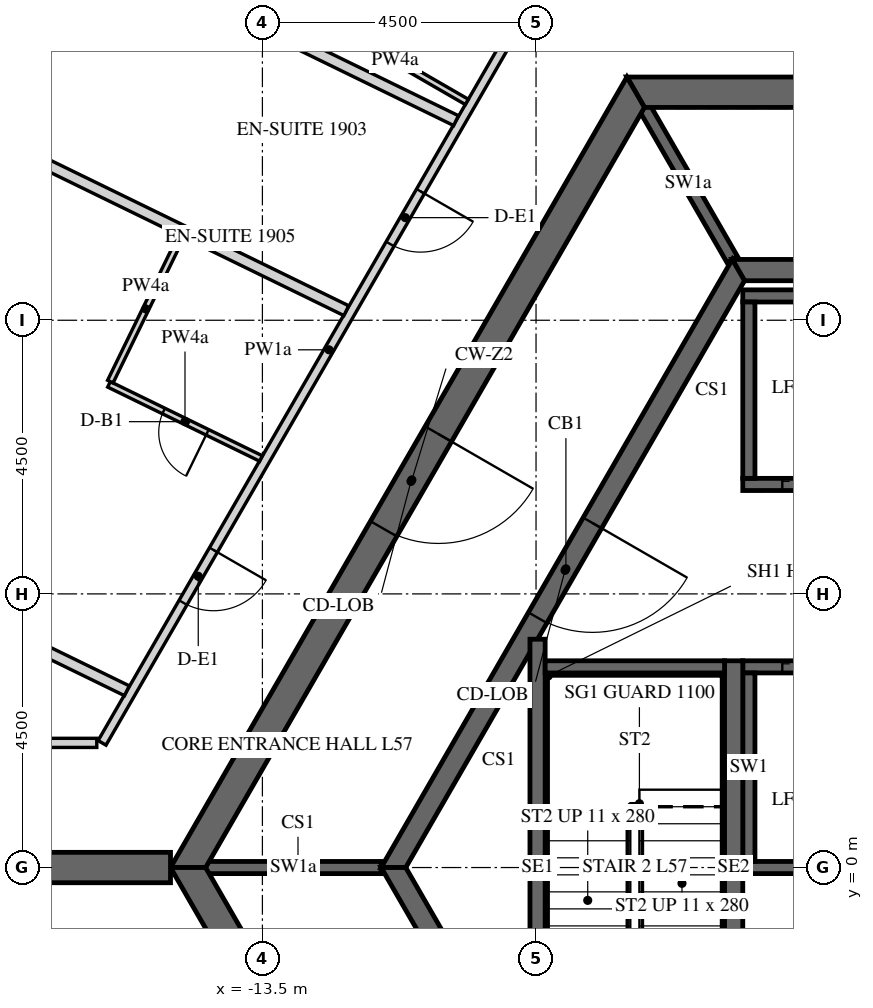
"""IFC4 building model, lengths in metres.
Left out: names, types, materials, properties, quantities, classifications, styles, units other than length and angle.
Written with IfcOpenShell. Run it as: python <this file> out.ifc"""

import sys

from ifc_helpers import new_model, si_unit, direction, frame, frame_2d, origin, place, context, subcontext, project, spatial, polyline, rectangle, outline, extrude, element, fill, save


model = new_model("IFC4")
c1 = context("Model", 3, precision=1e-05, world=origin(), true_north=direction((0.0, 1.0)))
c2 = subcontext(c1, "Body", "Model", "MODEL_VIEW")
j1 = project(units=[si_unit("LENGTHUNIT", "METRE"), si_unit("PLANEANGLEUNIT", "RADIAN")], contexts=[c1])
p1 = place(None, origin())
s1 = spatial("IfcSite", under=j1, at=p1, CompositionType="ELEMENT")
p2 = place(p1, origin())
s2 = spatial("IfcBuilding", under=s1, at=p2, CompositionType="ELEMENT")
p3 = place(p2, frame((0.0, 0.0, 238.5)))
s3 = spatial("IfcBuildingStorey", under=s2, at=p3, CompositionType="ELEMENT", Elevation=238.5)
p4 = place(p3, frame((-7.361, 12.75, -0.15), z_axis=(0.0, 0.0, 1.0), x_axis=(-0.50000571537, -0.866022103989, 0.0)))
e1 = element("IfcWall", 1, at=p4, inside=s3, PredefinedType="SHEAR", context=c2, shape_type="SweptSolid", body=[
    extrude(outline(polyline([(-0.144, -0.25), (14.867, -0.25), (14.578, 0.25), (0.144, 0.25), (-0.144, -0.25)])), origin(), (0.0, 0.0, 1.0), 3.9),
])
p5 = place(p4, frame((6.49, 0.0, 0.15)))
e2 = element("IfcOpeningElement", 2, at=p5, cuts=e1, PredefinedType="OPENING", context=c2, shape_type="SweptSolid", body=[
    extrude(rectangle(XDim=1.8, YDim=2.4, at=frame_2d((0.9, 1.2))), frame((0.0, 0.26, 0.0), z_axis=(0.0, -1.0, 0.0), x_axis=(1.0, 0.0, 0.0)), (0.0, 0.0, 1.0), 0.52),
])
p6 = place(p3, frame((-14.722, 0.0, -0.15), z_axis=(0.0, 0.0, 1.0), x_axis=(0.50000571537, -0.866022103989, 0.0)))
e3 = element("IfcWall", 3, at=p6, inside=s3, PredefinedType="SHEAR", context=c2, shape_type="SweptSolid", body=[
    extrude(outline(polyline([(-0.144, -0.25), (14.867, -0.25), (14.578, 0.25), (0.144, 0.25), (-0.144, -0.25)])), origin(), (0.0, 0.0, 1.0), 3.9),
])
p7 = place(p6, frame((6.432, 0.0, 0.15)))
e4 = element("IfcOpeningElement", 4, at=p7, cuts=e3, PredefinedType="OPENING", context=c2, shape_type="SweptSolid", body=[
    extrude(rectangle(XDim=1.8, YDim=2.4, at=frame_2d((0.9, 1.2))), frame((0.0, 0.26, 0.0), z_axis=(0.0, -1.0, 0.0), x_axis=(1.0, 0.0, 0.0)), (0.0, 0.0, 1.0), 0.52),
])
p8 = place(p3, frame((7.361, 12.75, -0.15), z_axis=(0.0, 0.0, 1.0), x_axis=(-1.0, 0.0, 0.0)))
e5 = element("IfcWall", 5, at=p8, inside=s3, PredefinedType="SHEAR", context=c2, shape_type="SweptSolid", body=[
    extrude(outline(polyline([(-0.144, -0.25), (14.866, -0.25), (14.578, 0.25), (0.144, 0.25), (-0.144, -0.25)])), origin(), (0.0, 0.0, 1.0), 3.9),
])
p9 = place(p8, frame((6.761, 0.0, 0.15)))
e6 = element("IfcOpeningElement", 6, at=p9, cuts=e5, PredefinedType="OPENING", context=c2, shape_type="SweptSolid", body=[
    extrude(rectangle(XDim=1.2, YDim=2.4, at=frame_2d((0.6, 1.2))), frame((0.0, 0.26, 0.0), z_axis=(0.0, -1.0, 0.0), x_axis=(1.0, 0.0, 0.0)), (0.0, 0.0, 1.0), 0.52),
])
p10 = place(p3, frame((-15.011, 0.0, -0.15), z_axis=(0.0, 0.0, 1.0), x_axis=(-1.0, 0.0, 0.0)))
e7 = element("IfcWall", 7, at=p10, inside=s3, PredefinedType="SHEAR", context=c2, shape_type="SweptSolid", body=[
    extrude(rectangle(XDim=15.424, YDim=0.5, at=frame_2d((7.712, 0.0))), origin(), (0.0, 0.0, 1.0), 3.9),
])
p11 = place(p10, frame((6.812, 0.0, 0.15)))
e8 = element("IfcOpeningElement", 8, at=p11, cuts=e7, PredefinedType="OPENING", context=c2, shape_type="SweptSolid", body=[
    extrude(rectangle(XDim=1.8, YDim=2.4, at=frame_2d((0.9, 1.2))), frame((0.0, 0.26, 0.0), z_axis=(0.0, -1.0, 0.0), x_axis=(1.0, 0.0, 0.0)), (0.0, 0.0, 1.0), 0.52),
])
p12 = place(p3, frame((-5.673, 9.825, -0.15), z_axis=(0.0, 0.0, 1.0), x_axis=(-0.499995046907, -0.866028263435, 0.0)))
e9 = element("IfcWall", 9, at=p12, inside=s3, PredefinedType="SHEAR", context=c2, shape_type="SweptSolid", body=[
    extrude(outline(polyline([(-0.101, -0.175), (11.446, -0.175), (11.244, 0.175), (0.101, 0.175), (-0.101, -0.175)])), origin(), (0.0, 0.0, 1.0), 3.9),
])
p13 = place(p12, frame((4.801, 0.0, 0.15)))
e10 = element("IfcOpeningElement", 10, at=p13, cuts=e9, PredefinedType="OPENING", context=c2, shape_type="SweptSolid", body=[
    extrude(rectangle(XDim=1.8, YDim=2.4, at=frame_2d((0.9, 1.2))), frame((0.0, 0.185, 0.0), z_axis=(0.0, -1.0, 0.0), x_axis=(1.0, 0.0, 0.0)), (0.0, 0.0, 1.0), 0.37),
])
p14 = place(p3, frame((-11.345, 0.0, -0.15), z_axis=(0.0, 0.0, 1.0), x_axis=(0.499995046907, -0.866028263435, 0.0)))
e11 = element("IfcWall", 11, at=p14, inside=s3, PredefinedType="SHEAR", context=c2, shape_type="SweptSolid", body=[
    extrude(outline(polyline([(-0.101, -0.175), (11.446, -0.175), (11.244, 0.175), (0.101, 0.175), (-0.101, -0.175)])), origin(), (0.0, 0.0, 1.0), 3.9),
])
p15 = place(p14, frame((4.744, 0.0, 0.15)))
e12 = element("IfcOpeningElement", 12, at=p15, cuts=e11, PredefinedType="OPENING", context=c2, shape_type="SweptSolid", body=[
    extrude(rectangle(XDim=1.8, YDim=2.4, at=frame_2d((0.9, 1.2))), frame((0.0, 0.185, 0.0), z_axis=(0.0, -1.0, 0.0), x_axis=(1.0, 0.0, 0.0)), (0.0, 0.0, 1.0), 0.37),
])
p16 = place(p3, frame((5.673, 9.825, -0.15), z_axis=(0.0, 0.0, 1.0), x_axis=(-1.0, 0.0, 0.0)))
e13 = element("IfcWall", 13, at=p16, inside=s3, PredefinedType="SHEAR", context=c2, shape_type="SweptSolid", body=[
    extrude(outline(polyline([(-0.101, -0.175), (11.446, -0.175), (11.244, 0.175), (0.101, 0.175), (-0.101, -0.175)])), origin(), (0.0, 0.0, 1.0), 3.9),
])
p17 = place(p3, frame((-5.6, 6.3, -0.25), z_axis=(0.0, 0.0, 1.0), x_axis=(1.0, 0.0, 0.0)))
e14 = element("IfcWall", 14, at=p17, inside=s3, PredefinedType="SHEAR", context=c2, shape_type="SweptSolid", body=[
    extrude(rectangle(XDim=11.2, YDim=0.2, at=frame_2d((5.6, 0.0))), origin(), (0.0, 0.0, 1.0), 3.9),
])
p18 = place(p17, frame((8.45, 0.0, 0.25)))
e15 = element("IfcOpeningElement", 15, at=p18, cuts=e14, PredefinedType="OPENING", context=c2, shape_type="SweptSolid", body=[
    extrude(rectangle(XDim=0.9, YDim=2.1, at=frame_2d((0.45, 1.05))), frame((0.0, 0.11, 0.0), z_axis=(0.0, -1.0, 0.0), x_axis=(1.0, 0.0, 0.0)), (0.0, 0.0, 1.0), 0.22),
])
p19 = place(p17, frame((0.65, 0.0, 0.25)))
e16 = element("IfcOpeningElement", 16, at=p19, cuts=e14, PredefinedType="OPENING", context=c2, shape_type="SweptSolid", body=[
    extrude(rectangle(XDim=1.1, YDim=2.1, at=frame_2d((0.55, 1.05))), frame((0.0, 0.11, 0.0), z_axis=(0.0, -1.0, 0.0), x_axis=(1.0, 0.0, 0.0)), (0.0, 0.0, 1.0), 0.22),
])
p20 = place(p17, frame((2.85, 0.0, 0.25)))
e17 = element("IfcOpeningElement", 17, at=p20, cuts=e14, PredefinedType="OPENING", context=c2, shape_type="SweptSolid", body=[
    extrude(rectangle(XDim=1.1, YDim=2.1, at=frame_2d((0.55, 1.05))), frame((0.0, 0.11, 0.0), z_axis=(0.0, -1.0, 0.0), x_axis=(1.0, 0.0, 0.0)), (0.0, 0.0, 1.0), 0.22),
])
p21 = place(p17, frame((5.05, 0.0, 0.25)))
e18 = element("IfcOpeningElement", 18, at=p21, cuts=e14, PredefinedType="OPENING", context=c2, shape_type="SweptSolid", body=[
    extrude(rectangle(XDim=1.1, YDim=2.1, at=frame_2d((0.55, 1.05))), frame((0.0, 0.11, 0.0), z_axis=(0.0, -1.0, 0.0), x_axis=(1.0, 0.0, 0.0)), (0.0, 0.0, 1.0), 0.22),
])
p22 = place(p3, frame((-5.6, 9.4, -0.25), z_axis=(0.0, 0.0, 1.0), x_axis=(1.0, 0.0, 0.0)))
e19 = element("IfcWall", 19, at=p22, inside=s3, PredefinedType="SHEAR", context=c2, shape_type="SweptSolid", body=[
    extrude(rectangle(XDim=11.2, YDim=0.2, at=frame_2d((5.6, 0.0))), origin(), (0.0, 0.0, 1.0), 3.9),
])
p23 = place(p3, frame((-5.5, 6.4, -0.25), z_axis=(0.0, 0.0, 1.0), x_axis=(0.0, 1.0, 0.0)))
e20 = element("IfcWall", 20, at=p23, inside=s3, PredefinedType="SHEAR", context=c2, shape_type="SweptSolid", body=[
    extrude(rectangle(XDim=2.9, YDim=0.2, at=frame_2d((1.45, 0.0))), origin(), (0.0, 0.0, 1.0), 3.9),
])
p24 = place(p3, frame((-5.6, 3.3, -0.25), z_axis=(0.0, 0.0, 1.0), x_axis=(1.0, 0.0, 0.0)))
e21 = element("IfcWall", 21, at=p24, inside=s3, PredefinedType="SHEAR", context=c2, shape_type="SweptSolid", body=[
    extrude(rectangle(XDim=11.2, YDim=0.2, at=frame_2d((5.6, 0.0))), origin(), (0.0, 0.0, 1.0), 3.9),
])
p25 = place(p24, frame((0.65, 0.0, 0.25)))
e22 = element("IfcOpeningElement", 22, at=p25, cuts=e21, PredefinedType="OPENING", context=c2, shape_type="SweptSolid", body=[
    extrude(rectangle(XDim=1.1, YDim=2.1, at=frame_2d((0.55, 1.05))), frame((0.0, 0.11, 0.0), z_axis=(0.0, -1.0, 0.0), x_axis=(1.0, 0.0, 0.0)), (0.0, 0.0, 1.0), 0.22),
])
p26 = place(p24, frame((2.85, 0.0, 0.25)))
e23 = element("IfcOpeningElement", 23, at=p26, cuts=e21, PredefinedType="OPENING", context=c2, shape_type="SweptSolid", body=[
    extrude(rectangle(XDim=1.1, YDim=2.1, at=frame_2d((0.55, 1.05))), frame((0.0, 0.11, 0.0), z_axis=(0.0, -1.0, 0.0), x_axis=(1.0, 0.0, 0.0)), (0.0, 0.0, 1.0), 0.22),
])
p27 = place(p24, frame((5.05, 0.0, 0.25)))
e24 = element("IfcOpeningElement", 24, at=p27, cuts=e21, PredefinedType="OPENING", context=c2, shape_type="SweptSolid", body=[
    extrude(rectangle(XDim=1.1, YDim=2.1, at=frame_2d((0.55, 1.05))), frame((0.0, 0.11, 0.0), z_axis=(0.0, -1.0, 0.0), x_axis=(1.0, 0.0, 0.0)), (0.0, 0.0, 1.0), 0.22),
])
p28 = place(p24, frame((7.25, 0.0, 0.25)))
e25 = element("IfcOpeningElement", 25, at=p28, cuts=e21, PredefinedType="OPENING", context=c2, shape_type="SweptSolid", body=[
    extrude(rectangle(XDim=1.1, YDim=2.1, at=frame_2d((0.55, 1.05))), frame((0.0, 0.11, 0.0), z_axis=(0.0, -1.0, 0.0), x_axis=(1.0, 0.0, 0.0)), (0.0, 0.0, 1.0), 0.22),
])
p29 = place(p24, frame((9.45, 0.0, 0.25)))
e26 = element("IfcOpeningElement", 26, at=p29, cuts=e21, PredefinedType="OPENING", context=c2, shape_type="SweptSolid", body=[
    extrude(rectangle(XDim=1.1, YDim=2.1, at=frame_2d((0.55, 1.05))), frame((0.0, 0.11, 0.0), z_axis=(0.0, -1.0, 0.0), x_axis=(1.0, 0.0, 0.0)), (0.0, 0.0, 1.0), 0.22),
])
p30 = place(p3, frame((-5.6, 0.0, -0.25), z_axis=(0.0, 0.0, 1.0), x_axis=(1.0, 0.0, 0.0)))
e27 = element("IfcWall", 27, at=p30, inside=s3, PredefinedType="SHEAR", context=c2, shape_type="SweptSolid", body=[
    extrude(rectangle(XDim=11.2, YDim=0.2, at=frame_2d((5.6, 0.0))), origin(), (0.0, 0.0, 1.0), 3.9),
])
p31 = place(p3, frame((-5.5, 0.1, -0.25), z_axis=(0.0, 0.0, 1.0), x_axis=(0.0, 1.0, 0.0)))
e28 = element("IfcWall", 28, at=p31, inside=s3, PredefinedType="SHEAR", context=c2, shape_type="SweptSolid", body=[
    extrude(rectangle(XDim=3.1, YDim=0.2, at=frame_2d((1.55, 0.0))), origin(), (0.0, 0.0, 1.0), 3.9),
])
for number, where, z_axis, x_axis in (
    (29, (-5.773, 10.0, -0.15), (0.0, 0.0, 1.0), (-0.5, 0.866, 0.0)),
    (30, (-11.547, 0.0, -0.15), (0.0, 0.0, 1.0), (-1.0, 0.0, 0.0)),
):
    element("IfcWall", number, at=place(p3, frame(where, z_axis=z_axis, x_axis=x_axis)), inside=s3, PredefinedType="SHEAR", context=c2, shape_type="SweptSolid", body=[
        extrude(rectangle(XDim=2.887, YDim=0.2, at=frame_2d((1.443, 0.0))), origin(), (0.0, 0.0, 1.0), 3.9),
    ])
p32 = place(p3, frame((-5.75, -3.4, -0.25), z_axis=(0.0, 0.0, 1.0), x_axis=(0.0, 1.0, 0.0)))
e31 = element("IfcWall", 31, at=p32, inside=s3, PredefinedType="SHEAR", context=c2, shape_type="SweptSolid", body=[
    extrude(rectangle(XDim=6.8, YDim=0.3, at=frame_2d((3.4, 0.0))), origin(), (0.0, 0.0, 1.0), 3.9),
])
p33 = place(p3, frame((-8.975, -3.755, -0.25), z_axis=(0.0, 0.0, 1.0), x_axis=(0.0, 1.0, 0.0)))
e32 = element("IfcWall", 32, at=p33, inside=s3, PredefinedType="SHEAR", context=c2, shape_type="SweptSolid", body=[
    extrude(rectangle(XDim=7.51, YDim=0.25, at=frame_2d((3.755, 0.0))), origin(), (0.0, 0.0, 1.0), 3.9),
])
p34 = place(p3, frame((-8.85, 3.3, -0.25), z_axis=(0.0, 0.0, 1.0), x_axis=(1.0, 0.0, 0.0)))
e33 = element("IfcWall", 33, at=p34, inside=s3, PredefinedType="SHEAR", context=c2, shape_type="SweptSolid", body=[
    extrude(rectangle(XDim=2.95, YDim=0.2, at=frame_2d((1.475, 0.0))), origin(), (0.0, 0.0, 1.0), 3.9),
])
p35 = place(p3, frame((-8.673, 14.978, 0.0), z_axis=(0.0, 0.0, 1.0), x_axis=(-0.50000700621, -0.86602135871, 0.0)))
e34 = element("IfcWall", 34, at=p35, inside=s3, PredefinedType="PARTITIONING", context=c2, shape_type="SweptSolid", body=[
    extrude(rectangle(XDim=14.928, YDim=0.15, at=frame_2d((7.464, 0.0))), origin(), (0.0, 0.0, 1.0), 2.838),
])
p36 = place(p35, frame((4.454, 0.0, 0.0)))
e35 = element("IfcOpeningElement", 35, at=p36, cuts=e34, PredefinedType="OPENING", context=c2, shape_type="SweptSolid", body=[
    extrude(rectangle(XDim=1.0, YDim=2.1, at=frame_2d((0.5, 1.05))), frame((0.0, 0.085, 0.0), z_axis=(0.0, -1.0, 0.0), x_axis=(1.0, 0.0, 0.0)), (0.0, 0.0, 1.0), 0.17),
])
p37 = place(p35, frame((11.264, 0.0, 0.0)))
e36 = element("IfcOpeningElement", 36, at=p37, cuts=e34, PredefinedType="OPENING", context=c2, shape_type="SweptSolid", body=[
    extrude(rectangle(XDim=1.0, YDim=2.1, at=frame_2d((0.5, 1.05))), frame((0.0, 0.085, 0.0), z_axis=(0.0, -1.0, 0.0), x_axis=(1.0, 0.0, 0.0)), (0.0, 0.0, 1.0), 0.17),
])
p38 = place(p3, frame((-16.224, 2.05, 0.0), z_axis=(0.0, 0.0, 1.0), x_axis=(-1.0, 0.0, 0.0)))
e37 = element("IfcWall", 37, at=p38, inside=s3, PredefinedType="PARTITIONING", context=c2, shape_type="SweptSolid", body=[
    extrude(rectangle(XDim=7.699, YDim=0.15, at=frame_2d((3.85, 0.0))), origin(), (0.0, 0.0, 1.0), 2.838),
])
p39 = place(p38, frame((2.437, 0.0, 0.0)))
e38 = element("IfcOpeningElement", 38, at=p39, cuts=e37, PredefinedType="OPENING", context=c2, shape_type="SweptSolid", body=[
    extrude(rectangle(XDim=1.0, YDim=2.1, at=frame_2d((0.5, 1.05))), frame((0.0, 0.085, 0.0), z_axis=(0.0, -1.0, 0.0), x_axis=(1.0, 0.0, 0.0)), (0.0, 0.0, 1.0), 0.17),
])
p40 = place(p3, frame((-10.138, 12.591, 0.0), z_axis=(0.0, 0.0, 1.0), x_axis=(-0.866051307416, 0.49995513091, 0.0)))
e39 = element("IfcWall", 39, at=p40, inside=s3, PredefinedType="PARTITIONING", context=c2, shape_type="SweptSolid", body=[
    extrude(rectangle(XDim=2.725, YDim=0.1, at=frame_2d((1.362, 0.0))), origin(), (0.0, 0.0, 1.0), 2.838),
])
p41 = place(p3, frame((-21.815, 17.892, 0.0), z_axis=(0.0, 0.0, 1.0), x_axis=(0.898799253997, -0.438360469265, 0.0)))
e40 = element("IfcWall", 40, at=p41, inside=s3, PredefinedType="PARTITIONING", context=c2, shape_type="SweptSolid", body=[
    extrude(rectangle(XDim=12.794, YDim=0.18, at=frame_2d((6.397, 0.0))), origin(), (0.0, 0.0, 1.0), 2.838),
])
p42 = place(p3, frame((-23.393, 14.656, 0.0), z_axis=(0.0, 0.0, 1.0), x_axis=(0.898790706576, -0.43837799417, 0.0)))
e41 = element("IfcWall", 41, at=p42, inside=s3, PredefinedType="PARTITIONING", context=c2, shape_type="SweptSolid", body=[
    extrude(rectangle(XDim=12.542, YDim=0.18, at=frame_2d((6.271, 0.0))), origin(), (0.0, 0.0, 1.0), 2.838),
])
p43 = place(p3, frame((-13.523, 6.727, 0.0), z_axis=(0.0, 0.0, 1.0), x_axis=(-0.89880809785, 0.438342335668, 0.0)))
e42 = element("IfcWall", 42, at=p43, inside=s3, PredefinedType="PARTITIONING", context=c2, shape_type="SweptSolid", body=[
    extrude(rectangle(XDim=2.781, YDim=0.1, at=frame_2d((1.391, 0.0))), origin(), (0.0, 0.0, 1.0), 2.838),
])
p44 = place(p43, frame((0.981, 0.0, 0.0)))
e43 = element("IfcOpeningElement", 43, at=p44, cuts=e42, PredefinedType="OPENING", context=c2, shape_type="SweptSolid", body=[
    extrude(rectangle(XDim=0.8, YDim=2.1, at=frame_2d((0.4, 1.05))), frame((0.0, 0.06, 0.0), z_axis=(0.0, -1.0, 0.0), x_axis=(1.0, 0.0, 0.0)), (0.0, 0.0, 1.0), 0.12),
])
p45 = place(p3, frame((-16.001, 7.991, 0.0), z_axis=(0.0, 0.0, 1.0), x_axis=(0.438344066549, 0.89880725371, 0.0)))
e44 = element("IfcWall", 44, at=p45, inside=s3, PredefinedType="PARTITIONING", context=c2, shape_type="SweptSolid", body=[
    extrude(rectangle(XDim=2.66, YDim=0.1, at=frame_2d((1.33, 0.0))), origin(), (0.0, 0.0, 1.0), 2.838),
])
p46 = place(p3, frame((-26.549, 8.185, 0.0), z_axis=(0.0, 0.0, 1.0), x_axis=(0.8987965099, -0.438366095623, 0.0)))
e45 = element("IfcWall", 45, at=p46, inside=s3, PredefinedType="PARTITIONING", context=c2, shape_type="SweptSolid", body=[
    extrude(rectangle(XDim=12.039, YDim=0.18, at=frame_2d((6.019, 0.0))), origin(), (0.0, 0.0, 1.0), 2.838),
])
p47 = place(p5, origin())
e46 = element("IfcDoor", 46, at=p47, inside=s3, OperationType="DOUBLE_DOOR_SINGLE_SWING", PredefinedType="DOOR", context=c2, shape_type="SweptSolid", body=[
    extrude(rectangle(XDim=1.8, YDim=2.4, at=frame_2d((0.9, 1.2))), frame((0.0, 0.025, 0.0), z_axis=(0.0, -1.0, 0.0), x_axis=(1.0, 0.0, 0.0)), (0.0, 0.0, 1.0), 0.05),
])
fill(e2, e46)
p48 = place(p13, origin())
e47 = element("IfcDoor", 47, at=p48, inside=s3, OperationType="DOUBLE_DOOR_SINGLE_SWING", PredefinedType="DOOR", context=c2, shape_type="SweptSolid", body=[
    extrude(rectangle(XDim=1.8, YDim=2.4, at=frame_2d((0.9, 1.2))), frame((0.0, 0.025, 0.0), z_axis=(0.0, -1.0, 0.0), x_axis=(1.0, 0.0, 0.0)), (0.0, 0.0, 1.0), 0.05),
])
fill(e10, e47)
p49 = place(p19, origin())
e48 = element("IfcDoor", 48, at=p49, inside=s3, OperationType="SLIDING_TO_LEFT", PredefinedType="DOOR", context=c2, shape_type="SweptSolid", body=[
    extrude(rectangle(XDim=1.1, YDim=2.1, at=frame_2d((0.55, 1.05))), frame((0.0, 0.025, 0.0), z_axis=(0.0, -1.0, 0.0), x_axis=(1.0, 0.0, 0.0)), (0.0, 0.0, 1.0), 0.05),
])
fill(e16, e48)
p50 = place(p25, origin())
e49 = element("IfcDoor", 49, at=p50, inside=s3, OperationType="SLIDING_TO_LEFT", PredefinedType="DOOR", context=c2, shape_type="SweptSolid", body=[
    extrude(rectangle(XDim=1.1, YDim=2.1, at=frame_2d((0.55, 1.05))), frame((0.0, 0.025, 0.0), z_axis=(0.0, -1.0, 0.0), x_axis=(1.0, 0.0, 0.0)), (0.0, 0.0, 1.0), 0.05),
])
fill(e22, e49)
p51 = place(p36, origin())
e50 = element("IfcDoor", 50, at=p51, inside=s3, OperationType="SINGLE_SWING_LEFT", PredefinedType="DOOR", context=c2, shape_type="SweptSolid", body=[
    extrude(rectangle(XDim=1.0, YDim=2.1, at=frame_2d((0.5, 1.05))), frame((0.0, 0.025, 0.0), z_axis=(0.0, -1.0, 0.0), x_axis=(1.0, 0.0, 0.0)), (0.0, 0.0, 1.0), 0.05),
])
fill(e35, e50)
p52 = place(p37, origin())
e51 = element("IfcDoor", 51, at=p52, inside=s3, OperationType="SINGLE_SWING_LEFT", PredefinedType="DOOR", context=c2, shape_type="SweptSolid", body=[
    extrude(rectangle(XDim=1.0, YDim=2.1, at=frame_2d((0.5, 1.05))), frame((0.0, 0.025, 0.0), z_axis=(0.0, -1.0, 0.0), x_axis=(1.0, 0.0, 0.0)), (0.0, 0.0, 1.0), 0.05),
])
fill(e36, e51)
p53 = place(p44, origin())
e52 = element("IfcDoor", 52, at=p53, inside=s3, OperationType="SINGLE_SWING_RIGHT", PredefinedType="DOOR", context=c2, shape_type="SweptSolid", body=[
    extrude(rectangle(XDim=0.8, YDim=2.1, at=frame_2d((0.4, 1.05))), frame((0.0, 0.025, 0.0), z_axis=(0.0, -1.0, 0.0), x_axis=(1.0, 0.0, 0.0)), (0.0, 0.0, 1.0), 0.05),
])
fill(e43, e52)
save(model, sys.argv[1])
